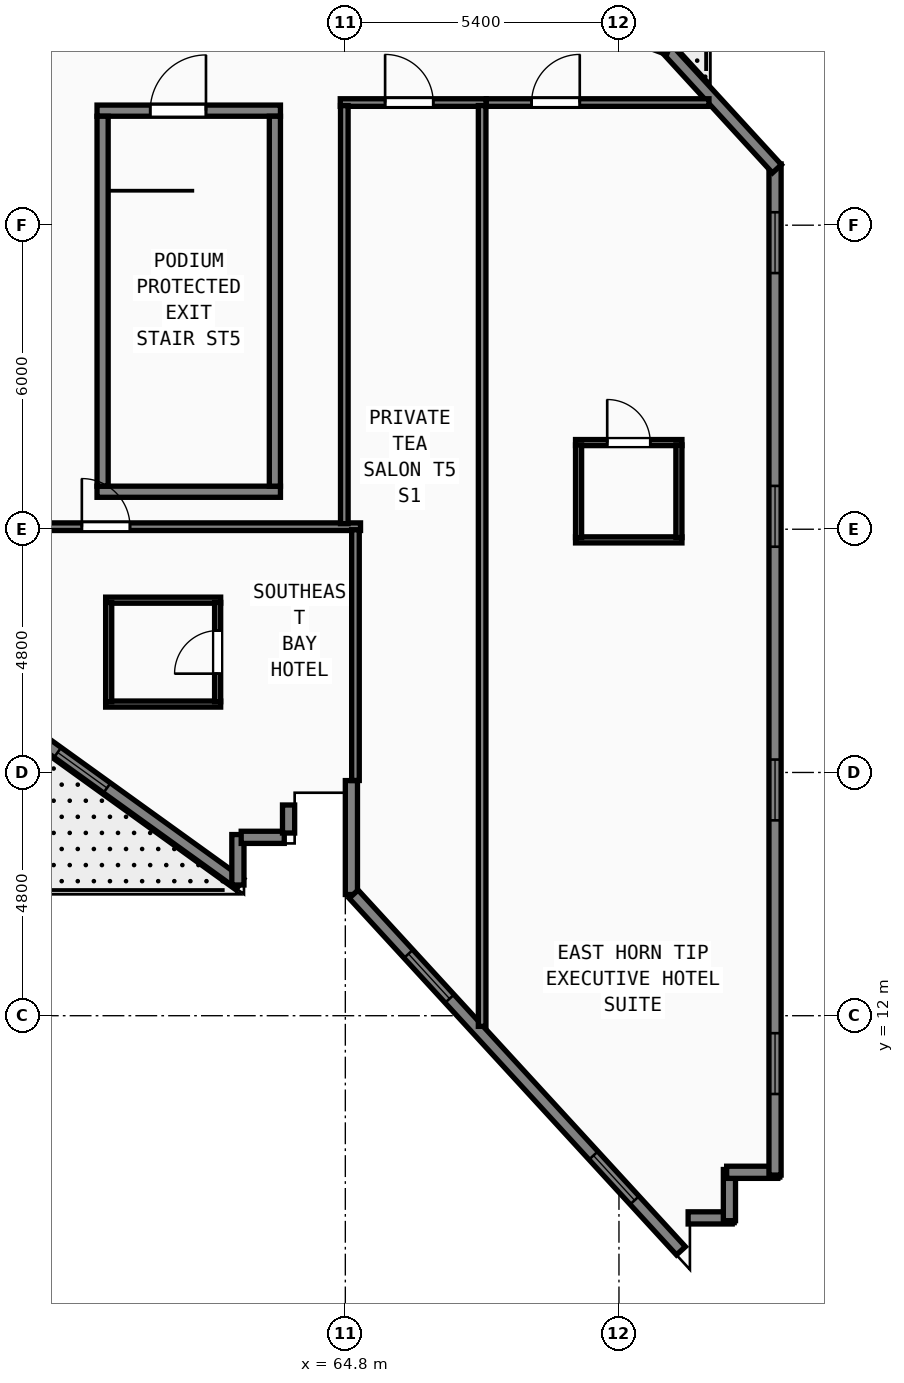
"""IFC4 building model, lengths in metres.
Left out: names, types, materials, properties, quantities, classifications, styles, units other than length and angle.
Written with IfcOpenShell. Run it as: python <this file> out.ifc"""

import sys

from ifc_helpers import new_model, si_unit, direction, frame, frame_2d, origin, origin_2d, place, context, subcontext, project, spatial, rectangle, hollow_rectangle, extrude, element, fill, save


model = new_model("IFC4")
c1 = context("Model", 3, precision=1e-05, world=origin(), true_north=direction((0.0, 1.0)))
c2 = subcontext(c1, "Body", "Model", "MODEL_VIEW")
j1 = project(units=[si_unit("LENGTHUNIT", "METRE"), si_unit("PLANEANGLEUNIT", "RADIAN")], contexts=[c1])
p1 = place(None, origin())
s1 = spatial("IfcSite", under=j1, at=p1, CompositionType="ELEMENT")
p2 = place(p1, origin())
s2 = spatial("IfcBuilding", under=s1, at=p2, CompositionType="ELEMENT")
p3 = place(p2, frame((0.0, 0.0, 24.0)))
s3 = spatial("IfcBuildingStorey", under=s2, at=p3, CompositionType="ELEMENT", Elevation=24.0)
p4 = place(p3, frame((59.9, 29.86, 0.0), z_axis=(0.0, 0.0, 1.0), x_axis=(1.0, 0.0, 0.0)))
e1 = element("IfcWall", 1, at=p4, inside=s3, PredefinedType="SHEAR", context=c2, shape_type="SweptSolid", body=[
    extrude(rectangle(XDim=3.62, YDim=0.22, at=frame_2d((1.81, 0.0))), origin(), (0.0, 0.0, 1.0), 3.6),
])
p5 = place(p4, frame((1.05, 0.0, 0.0)))
e2 = element("IfcOpeningElement", 2, at=p5, cuts=e1, PredefinedType="OPENING", context=c2, shape_type="SweptSolid", body=[
    extrude(rectangle(XDim=1.1, YDim=2.15, at=frame_2d((0.55, 1.075))), frame((0.0, 0.12, 0.0), z_axis=(0.0, -1.0, 0.0), x_axis=(1.0, 0.0, 0.0)), (0.0, 0.0, 1.0), 0.24),
])
p6 = place(p3, frame((59.9, 22.34, 0.0), z_axis=(0.0, 0.0, 1.0), x_axis=(1.0, 0.0, 0.0)))
e3 = element("IfcWall", 3, at=p6, inside=s3, PredefinedType="SHEAR", context=c2, shape_type="SweptSolid", body=[
    extrude(rectangle(XDim=3.62, YDim=0.22, at=frame_2d((1.81, 0.0))), origin(), (0.0, 0.0, 1.0), 3.6),
])
for number, where, z_axis, x_axis in (
    (4, (60.01, 22.45, 0.0), (0.0, 0.0, 1.0), (0.0, 1.0, 0.0)),
    (5, (63.41, 22.45, 0.0), (0.0, 0.0, 1.0), (0.0, 1.0, 0.0)),
):
    element("IfcWall", number, at=place(p3, frame(where, z_axis=z_axis, x_axis=x_axis)), inside=s3, PredefinedType="SHEAR", context=c2, shape_type="SweptSolid", body=[
        extrude(rectangle(XDim=7.3, YDim=0.22, at=frame_2d((3.65, 0.0))), origin(), (0.0, 0.0, 1.0), 3.6),
    ])
for number, where, z_axis, x_axis in (
    (6, (64.2, 16.8, 0.0), (0.0, 0.0, 1.0), (1.0, 0.0, 0.0)),
    (7, (64.2, 27.6, 0.0), (0.0, 0.0, 1.0), (1.0, 0.0, 0.0)),
):
    element("IfcColumn", number, at=place(p3, frame(where, z_axis=z_axis, x_axis=x_axis)), inside=s3, PredefinedType="COLUMN", context=c2, shape_type="SweptSolid", body=[
        extrude(hollow_rectangle(XDim=1.3, YDim=1.3, WallThickness=0.048, at=origin_2d()), origin(), (0.0, 0.0, 1.0), 3.8),
    ])
for number, where, z_axis, x_axis in (
    (8, (70.8, 17.4, 0.0), (0.0, 0.0, 1.0), (1.0, 0.0, 0.0)),
    (9, (70.8, 27.6, 0.0), (0.0, 0.0, 1.0), (1.0, 0.0, 0.0)),
):
    element("IfcColumn", number, at=place(p3, frame(where, z_axis=z_axis, x_axis=x_axis)), inside=s3, PredefinedType="COLUMN", context=c2, shape_type="SweptSolid", body=[
        extrude(hollow_rectangle(XDim=1.15, YDim=1.15, WallThickness=0.042, at=origin_2d()), origin(), (0.0, 0.0, 1.0), 3.8),
    ])
for number, where, z_axis, x_axis in (
    (10, (67.5, 17.1, -0.26), (0.0, 0.0, 1.0), (1.0, 0.0, 0.0)),
    (11, (67.5, 27.6, -0.26), (0.0, 0.0, 1.0), (1.0, 0.0, 0.0)),
):
    element("IfcColumn", number, at=place(p3, frame(where, z_axis=z_axis, x_axis=x_axis)), inside=s3, PredefinedType="COLUMN", context=c2, shape_type="SweptSolid", body=[
        extrude(hollow_rectangle(XDim=1.0, YDim=1.0, WallThickness=0.038, at=origin_2d()), origin(), (0.0, 0.0, 1.0), 4.06),
    ])
p7 = place(p3, frame((53.442, 21.286, 0.0), z_axis=(0.0, 0.0, 1.0), x_axis=(0.811542842993, -0.584292917967, 0.0)))
e12 = element("IfcWall", 12, at=p7, inside=s3, PredefinedType="SOLIDWALL", context=c2, shape_type="SweptSolid", body=[
    extrude(rectangle(XDim=11.438, YDim=0.24, at=frame_2d((5.719, 0.0))), origin(), (0.0, 0.0, 1.0), 3.097),
])
p8 = place(p7, frame((1.6, 0.0, 0.85)))
e13 = element("IfcOpeningElement", 13, at=p8, cuts=e12, PredefinedType="OPENING", context=c2, shape_type="SweptSolid", body=[
    extrude(rectangle(XDim=1.2, YDim=1.85, at=frame_2d((0.6, 0.925))), frame((0.0, 0.13, 0.0), z_axis=(0.0, -1.0, 0.0), x_axis=(1.0, 0.0, 0.0)), (0.0, 0.0, 1.0), 0.26),
])
p9 = place(p7, frame((7.0, 0.0, 0.85)))
e14 = element("IfcOpeningElement", 14, at=p9, cuts=e12, PredefinedType="OPENING", context=c2, shape_type="SweptSolid", body=[
    extrude(rectangle(XDim=1.2, YDim=1.85, at=frame_2d((0.6, 0.925))), frame((0.0, 0.13, 0.0), z_axis=(0.0, -1.0, 0.0), x_axis=(1.0, 0.0, 0.0)), (0.0, 0.0, 1.0), 0.26),
])
p10 = place(p3, frame((62.68, 14.579, 0.0), z_axis=(0.0, 0.0, 1.0), x_axis=(0.0, 1.0, 0.0)))
e15 = element("IfcWall", 15, at=p10, inside=s3, PredefinedType="SOLIDWALL", context=c2, shape_type="SweptSolid", body=[
    extrude(rectangle(XDim=0.996, YDim=0.24, at=frame_2d((0.498, 0.0))), origin(), (0.0, 0.0, 1.0), 3.6),
])
p11 = place(p3, frame((62.745, 15.52, 0.0), z_axis=(0.0, 0.0, 1.0), x_axis=(1.0, 0.0, 0.0)))
e16 = element("IfcWall", 16, at=p11, inside=s3, PredefinedType="SOLIDWALL", context=c2, shape_type="SweptSolid", body=[
    extrude(rectangle(XDim=0.85, YDim=0.24, at=frame_2d((0.425, 0.0))), origin(), (0.0, 0.0, 1.0), 3.6),
])
p12 = place(p3, frame((63.68, 15.605, 0.0), z_axis=(0.0, 0.0, 1.0), x_axis=(0.0, 1.0, 0.0)))
e17 = element("IfcWall", 17, at=p12, inside=s3, PredefinedType="SOLIDWALL", context=c2, shape_type="SweptSolid", body=[
    extrude(rectangle(XDim=0.553, YDim=0.24, at=frame_2d((0.276, 0.0))), origin(), (0.0, 0.0, 1.0), 3.6),
])
p13 = place(p3, frame((64.92, 16.64, 0.0), z_axis=(0.0, 0.0, 1.0), x_axis=(0.0, -1.0, 0.0)))
e18 = element("IfcWall", 18, at=p13, inside=s3, PredefinedType="SOLIDWALL", context=c2, shape_type="SweptSolid", body=[
    extrude(rectangle(XDim=2.248, YDim=0.24, at=frame_2d((1.124, 0.0))), origin(), (0.0, 0.0, 1.0), 3.6),
])
p14 = place(p3, frame((64.964, 14.399, 0.0), z_axis=(0.0, 0.0, 1.0), x_axis=(0.676144639244, -0.736768910054, 0.0)))
e19 = element("IfcWall", 19, at=p14, inside=s3, PredefinedType="SOLIDWALL", context=c2, shape_type="SweptSolid", body=[
    extrude(rectangle(XDim=9.552, YDim=0.24, at=frame_2d((4.776, 0.0))), origin(), (0.0, 0.0, 1.0), 3.6),
])
p15 = place(p14, frame((1.6, 0.0, 0.85)))
e20 = element("IfcOpeningElement", 20, at=p15, cuts=e19, PredefinedType="OPENING", context=c2, shape_type="SweptSolid", body=[
    extrude(rectangle(XDim=1.2, YDim=1.85, at=frame_2d((0.6, 0.925))), frame((0.0, 0.13, 0.0), z_axis=(0.0, -1.0, 0.0), x_axis=(1.0, 0.0, 0.0)), (0.0, 0.0, 1.0), 0.26),
])
p16 = place(p14, frame((7.0, 0.0, 0.85)))
e21 = element("IfcOpeningElement", 21, at=p16, cuts=e19, PredefinedType="OPENING", context=c2, shape_type="SweptSolid", body=[
    extrude(rectangle(XDim=1.2, YDim=1.85, at=frame_2d((0.6, 0.925))), frame((0.0, 0.13, 0.0), z_axis=(0.0, -1.0, 0.0), x_axis=(1.0, 0.0, 0.0)), (0.0, 0.0, 1.0), 0.26),
])
p17 = place(p3, frame((71.565, 8.01, 0.0), z_axis=(0.0, 0.0, 1.0), x_axis=(1.0, 0.0, 0.0)))
e22 = element("IfcWall", 22, at=p17, inside=s3, PredefinedType="SOLIDWALL", context=c2, shape_type="SweptSolid", body=[
    extrude(rectangle(XDim=0.87, YDim=0.24, at=frame_2d((0.435, 0.0))), origin(), (0.0, 0.0, 1.0), 3.6),
])
for number, where, z_axis, x_axis in (
    (23, (72.38, 7.955, 0.0), (0.0, 0.0, 1.0), (0.0, 1.0, 0.0)),
    (24, (72.325, 8.91, 0.0), (0.0, 0.0, 1.0), (1.0, 0.0, 0.0)),
):
    element("IfcWall", number, at=place(p3, frame(where, z_axis=z_axis, x_axis=x_axis)), inside=s3, PredefinedType="SOLIDWALL", context=c2, shape_type="SweptSolid", body=[
        extrude(rectangle(XDim=1.01, YDim=0.24, at=frame_2d((0.505, 0.0))), origin(), (0.0, 0.0, 1.0), 3.6),
    ])
p18 = place(p3, frame((73.28, 8.855, 0.0), z_axis=(0.0, 0.0, 1.0), x_axis=(0.0, 1.0, 0.0)))
e25 = element("IfcWall", 25, at=p18, inside=s3, PredefinedType="SOLIDWALL", context=c2, shape_type="SweptSolid", body=[
    extrude(rectangle(XDim=19.953, YDim=0.24, at=frame_2d((9.977, 0.0))), origin(), (0.0, 0.0, 1.0), 3.6),
])
p19 = place(p18, frame((1.6, 0.0, 0.85)))
e26 = element("IfcOpeningElement", 26, at=p19, cuts=e25, PredefinedType="OPENING", context=c2, shape_type="SweptSolid", body=[
    extrude(rectangle(XDim=1.2, YDim=1.85, at=frame_2d((0.6, 0.925))), frame((0.0, 0.13, 0.0), z_axis=(0.0, -1.0, 0.0), x_axis=(1.0, 0.0, 0.0)), (0.0, 0.0, 1.0), 0.26),
])
p20 = place(p18, frame((7.0, 0.0, 0.85)))
e27 = element("IfcOpeningElement", 27, at=p20, cuts=e25, PredefinedType="OPENING", context=c2, shape_type="SweptSolid", body=[
    extrude(rectangle(XDim=1.2, YDim=1.85, at=frame_2d((0.6, 0.925))), frame((0.0, 0.13, 0.0), z_axis=(0.0, -1.0, 0.0), x_axis=(1.0, 0.0, 0.0)), (0.0, 0.0, 1.0), 0.26),
])
p21 = place(p18, frame((12.4, 0.0, 0.85)))
e28 = element("IfcOpeningElement", 28, at=p21, cuts=e25, PredefinedType="OPENING", context=c2, shape_type="SweptSolid", body=[
    extrude(rectangle(XDim=1.2, YDim=1.85, at=frame_2d((0.6, 0.925))), frame((0.0, 0.13, 0.0), z_axis=(0.0, -1.0, 0.0), x_axis=(1.0, 0.0, 0.0)), (0.0, 0.0, 1.0), 0.26),
])
p22 = place(p18, frame((17.8, 0.0, 0.85)))
e29 = element("IfcOpeningElement", 29, at=p22, cuts=e25, PredefinedType="OPENING", context=c2, shape_type="SweptSolid", body=[
    extrude(rectangle(XDim=1.2, YDim=1.85, at=frame_2d((0.6, 0.925))), frame((0.0, 0.13, 0.0), z_axis=(0.0, -1.0, 0.0), x_axis=(1.0, 0.0, 0.0)), (0.0, 0.0, 1.0), 0.26),
])
p23 = place(p3, frame((73.317, 28.713, 0.0), z_axis=(0.0, 0.0, 1.0), x_axis=(-0.675758228752, 0.737123338577, 0.0)))
e30 = element("IfcWall", 30, at=p23, inside=s3, PredefinedType="SOLIDWALL", context=c2, shape_type="SweptSolid", body=[
    extrude(rectangle(XDim=3.29, YDim=0.24, at=frame_2d((1.645, 0.0))), origin(), (0.0, 0.0, 1.0), 3.6),
])
p24 = place(p3, frame((71.183, 31.078, 0.0), z_axis=(0.0, 0.0, 1.0), x_axis=(-0.936332044214, 0.351115797106, 0.0)))
e31 = element("IfcWall", 31, at=p24, inside=s3, PredefinedType="SOLIDWALL", context=c2, shape_type="SweptSolid", body=[
    extrude(rectangle(XDim=7.0, YDim=0.24, at=frame_2d((3.5, 0.0))), origin(), (0.0, 0.0, 1.0), 3.6),
])
p25 = place(p24, frame((1.6, 0.0, 0.85)))
e32 = element("IfcOpeningElement", 32, at=p25, cuts=e31, PredefinedType="OPENING", context=c2, shape_type="SweptSolid", body=[
    extrude(rectangle(XDim=1.2, YDim=1.85, at=frame_2d((0.6, 0.925))), frame((0.0, 0.13, 0.0), z_axis=(0.0, -1.0, 0.0), x_axis=(1.0, 0.0, 0.0)), (0.0, 0.0, 1.0), 0.26),
])
p26 = place(p3, frame((57.86, 21.65, 0.0), z_axis=(0.0, 0.0, 1.0), x_axis=(1.0, 0.0, 0.0)))
e33 = element("IfcWall", 33, at=p26, inside=s3, PredefinedType="PARTITIONING", context=c2, shape_type="SweptSolid", body=[
    extrude(rectangle(XDim=7.24, YDim=0.15, at=frame_2d((3.62, 0.0))), origin(), (0.0, 0.0, 1.0), 3.6),
])
p27 = place(p26, frame((2.69, 0.0, 0.0), z_axis=(0.0, 0.0, 1.0), x_axis=(-1.0, 0.0, 0.0)))
e34 = element("IfcOpeningElement", 34, at=p27, cuts=e33, PredefinedType="OPENING", context=c2, shape_type="SweptSolid", body=[
    extrude(rectangle(XDim=0.95, YDim=2.15, at=frame_2d((0.475, 1.075))), frame((0.0, 0.085, 0.0), z_axis=(0.0, -1.0, 0.0), x_axis=(1.0, 0.0, 0.0)), (0.0, 0.0, 1.0), 0.17),
])
p28 = place(p3, frame((65.0, 16.642, 0.0), z_axis=(0.0, 0.0, 1.0), x_axis=(0.0, 1.0, 0.0)))
e35 = element("IfcWall", 35, at=p28, inside=s3, PredefinedType="PARTITIONING", context=c2, shape_type="SweptSolid", body=[
    extrude(rectangle(XDim=4.948, YDim=0.15, at=frame_2d((2.474, 0.0))), origin(), (0.0, 0.0, 1.0), 3.6),
])
for number, where, z_axis, x_axis in (
    (36, (60.07, 20.2, 0.0), (0.0, 0.0, 1.0), (1.0, 0.0, 0.0)),
    (37, (60.07, 18.15, 0.0), (0.0, 0.0, 1.0), (1.0, 0.0, 0.0)),
):
    element("IfcWall", number, at=place(p3, frame(where, z_axis=z_axis, x_axis=x_axis)), inside=s3, PredefinedType="PARTITIONING", context=c2, shape_type="SweptSolid", body=[
        extrude(rectangle(XDim=2.27, YDim=0.12, at=frame_2d((1.135, 0.0))), origin(), (0.0, 0.0, 1.0), 3.6),
    ])
p29 = place(p3, frame((60.13, 18.195, 0.0), z_axis=(0.0, 0.0, 1.0), x_axis=(0.0, 1.0, 0.0)))
e38 = element("IfcWall", 38, at=p29, inside=s3, PredefinedType="PARTITIONING", context=c2, shape_type="SweptSolid", body=[
    extrude(rectangle(XDim=1.96, YDim=0.12, at=frame_2d((0.98, 0.0))), origin(), (0.0, 0.0, 1.0), 3.6),
])
p30 = place(p3, frame((62.28, 18.195, 0.0), z_axis=(0.0, 0.0, 1.0), x_axis=(0.0, 1.0, 0.0)))
e39 = element("IfcWall", 39, at=p30, inside=s3, PredefinedType="PARTITIONING", context=c2, shape_type="SweptSolid", body=[
    extrude(rectangle(XDim=1.96, YDim=0.12, at=frame_2d((0.98, 0.0))), origin(), (0.0, 0.0, 1.0), 3.6),
])
p31 = place(p30, frame((0.555, 0.0, 0.0)))
e40 = element("IfcOpeningElement", 40, at=p31, cuts=e39, PredefinedType="OPENING", context=c2, shape_type="SweptSolid", body=[
    extrude(rectangle(XDim=0.85, YDim=2.1, at=frame_2d((0.425, 1.05))), frame((0.0, 0.07, 0.0), z_axis=(0.0, -1.0, 0.0), x_axis=(1.0, 0.0, 0.0)), (0.0, 0.0, 1.0), 0.14),
])
p32 = place(p3, frame((64.7, 30.02, 0.0), z_axis=(0.0, 0.0, 1.0), x_axis=(1.0, 0.0, 0.0)))
e41 = element("IfcWall", 41, at=p32, inside=s3, PredefinedType="PARTITIONING", context=c2, shape_type="SweptSolid", body=[
    extrude(rectangle(XDim=2.88, YDim=0.15, at=frame_2d((1.44, 0.0))), origin(), (0.0, 0.0, 1.0), 3.6),
])
p33 = place(p32, frame((1.835, 0.0, 0.0), z_axis=(0.0, 0.0, 1.0), x_axis=(-1.0, 0.0, 0.0)))
e42 = element("IfcOpeningElement", 42, at=p33, cuts=e41, PredefinedType="OPENING", context=c2, shape_type="SweptSolid", body=[
    extrude(rectangle(XDim=0.95, YDim=2.12, at=frame_2d((0.475, 1.06))), frame((0.0, 0.085, 0.0), z_axis=(0.0, -1.0, 0.0), x_axis=(1.0, 0.0, 0.0)), (0.0, 0.0, 1.0), 0.17),
])
p34 = place(p3, frame((64.78, 21.71, 0.0), z_axis=(0.0, 0.0, 1.0), x_axis=(0.0, 1.0, 0.0)))
e43 = element("IfcWall", 43, at=p34, inside=s3, PredefinedType="PARTITIONING", context=c2, shape_type="SweptSolid", body=[
    extrude(rectangle(XDim=8.25, YDim=0.15, at=frame_2d((4.125, 0.0))), origin(), (0.0, 0.0, 1.0), 3.6),
])
p35 = place(p3, frame((67.5, 11.791, 0.0), z_axis=(0.0, 0.0, 1.0), x_axis=(0.0, 1.0, 0.0)))
e44 = element("IfcWall", 44, at=p35, inside=s3, PredefinedType="PARTITIONING", context=c2, shape_type="SweptSolid", body=[
    extrude(rectangle(XDim=18.169, YDim=0.15, at=frame_2d((9.085, 0.0))), origin(), (0.0, 0.0, 1.0), 3.6),
])
p36 = place(p3, frame((67.582, 30.02, 0.0), z_axis=(0.0, 0.0, 1.0), x_axis=(1.0, 0.0, 0.0)))
e45 = element("IfcWall", 45, at=p36, inside=s3, PredefinedType="PARTITIONING", context=c2, shape_type="SweptSolid", body=[
    extrude(rectangle(XDim=4.394, YDim=0.15, at=frame_2d((2.197, 0.0))), origin(), (0.0, 0.0, 1.0), 3.6),
])
p37 = place(p36, frame((1.844, 0.0, 0.0), z_axis=(0.0, 0.0, 1.0), x_axis=(-1.0, 0.0, 0.0)))
e46 = element("IfcOpeningElement", 46, at=p37, cuts=e45, PredefinedType="OPENING", context=c2, shape_type="SweptSolid", body=[
    extrude(rectangle(XDim=0.95, YDim=2.18, at=frame_2d((0.475, 1.09))), frame((0.0, 0.085, 0.0), z_axis=(0.0, -1.0, 0.0), x_axis=(1.0, 0.0, 0.0)), (0.0, 0.0, 1.0), 0.17),
])
p38 = place(p3, frame((69.343, 23.31, 0.0), z_axis=(0.0, 0.0, 1.0), x_axis=(1.0, 0.0, 0.0)))
e47 = element("IfcWall", 47, at=p38, inside=s3, PredefinedType="PARTITIONING", context=c2, shape_type="SweptSolid", body=[
    extrude(rectangle(XDim=2.1, YDim=0.12, at=frame_2d((1.05, 0.0))), origin(), (0.0, 0.0, 1.0), 3.6),
])
p39 = place(p38, frame((1.475, 0.0, 0.0), z_axis=(0.0, 0.0, 1.0), x_axis=(-1.0, 0.0, 0.0)))
e48 = element("IfcOpeningElement", 48, at=p39, cuts=e47, PredefinedType="OPENING", context=c2, shape_type="SweptSolid", body=[
    extrude(rectangle(XDim=0.85, YDim=2.1, at=frame_2d((0.425, 1.05))), frame((0.0, 0.07, 0.0), z_axis=(0.0, -1.0, 0.0), x_axis=(1.0, 0.0, 0.0)), (0.0, 0.0, 1.0), 0.14),
])
p40 = place(p3, frame((69.343, 21.39, 0.0), z_axis=(0.0, 0.0, 1.0), x_axis=(1.0, 0.0, 0.0)))
e49 = element("IfcWall", 49, at=p40, inside=s3, PredefinedType="PARTITIONING", context=c2, shape_type="SweptSolid", body=[
    extrude(rectangle(XDim=2.1, YDim=0.12, at=frame_2d((1.05, 0.0))), origin(), (0.0, 0.0, 1.0), 3.6),
])
for number, where, z_axis, x_axis in (
    (50, (69.403, 21.435, 0.0), (0.0, 0.0, 1.0), (0.0, 1.0, 0.0)),
    (51, (71.383, 21.435, 0.0), (0.0, 0.0, 1.0), (0.0, 1.0, 0.0)),
):
    element("IfcWall", number, at=place(p3, frame(where, z_axis=z_axis, x_axis=x_axis)), inside=s3, PredefinedType="PARTITIONING", context=c2, shape_type="SweptSolid", body=[
        extrude(rectangle(XDim=1.83, YDim=0.12, at=frame_2d((0.915, 0.0))), origin(), (0.0, 0.0, 1.0), 3.6),
    ])
p41 = place(p9, origin())
e52 = element("IfcWindow", 52, at=p41, inside=s3, PartitioningType="SINGLE_PANEL", PredefinedType="WINDOW", context=c2, shape_type="SweptSolid", body=[
    extrude(rectangle(XDim=1.2, YDim=1.85, at=frame_2d((0.6, 0.925))), frame((0.0, 0.03, 0.0), z_axis=(0.0, -1.0, 0.0), x_axis=(1.0, 0.0, 0.0)), (0.0, 0.0, 1.0), 0.06),
])
fill(e14, e52)
p42 = place(p15, origin())
e53 = element("IfcWindow", 53, at=p42, inside=s3, PartitioningType="SINGLE_PANEL", PredefinedType="WINDOW", context=c2, shape_type="SweptSolid", body=[
    extrude(rectangle(XDim=1.2, YDim=1.85, at=frame_2d((0.6, 0.925))), frame((0.0, 0.03, 0.0), z_axis=(0.0, -1.0, 0.0), x_axis=(1.0, 0.0, 0.0)), (0.0, 0.0, 1.0), 0.06),
])
fill(e20, e53)
p43 = place(p16, origin())
e54 = element("IfcWindow", 54, at=p43, inside=s3, PartitioningType="SINGLE_PANEL", PredefinedType="WINDOW", context=c2, shape_type="SweptSolid", body=[
    extrude(rectangle(XDim=1.2, YDim=1.85, at=frame_2d((0.6, 0.925))), frame((0.0, 0.03, 0.0), z_axis=(0.0, -1.0, 0.0), x_axis=(1.0, 0.0, 0.0)), (0.0, 0.0, 1.0), 0.06),
])
fill(e21, e54)
p44 = place(p19, origin())
e55 = element("IfcWindow", 55, at=p44, inside=s3, PartitioningType="SINGLE_PANEL", PredefinedType="WINDOW", context=c2, shape_type="SweptSolid", body=[
    extrude(rectangle(XDim=1.2, YDim=1.85, at=frame_2d((0.6, 0.925))), frame((0.0, 0.03, 0.0), z_axis=(0.0, -1.0, 0.0), x_axis=(1.0, 0.0, 0.0)), (0.0, 0.0, 1.0), 0.06),
])
fill(e26, e55)
p45 = place(p20, origin())
e56 = element("IfcWindow", 56, at=p45, inside=s3, PartitioningType="SINGLE_PANEL", PredefinedType="WINDOW", context=c2, shape_type="SweptSolid", body=[
    extrude(rectangle(XDim=1.2, YDim=1.85, at=frame_2d((0.6, 0.925))), frame((0.0, 0.03, 0.0), z_axis=(0.0, -1.0, 0.0), x_axis=(1.0, 0.0, 0.0)), (0.0, 0.0, 1.0), 0.06),
])
fill(e27, e56)
p46 = place(p21, origin())
e57 = element("IfcWindow", 57, at=p46, inside=s3, PartitioningType="SINGLE_PANEL", PredefinedType="WINDOW", context=c2, shape_type="SweptSolid", body=[
    extrude(rectangle(XDim=1.2, YDim=1.85, at=frame_2d((0.6, 0.925))), frame((0.0, 0.03, 0.0), z_axis=(0.0, -1.0, 0.0), x_axis=(1.0, 0.0, 0.0)), (0.0, 0.0, 1.0), 0.06),
])
fill(e28, e57)
p47 = place(p22, origin())
e58 = element("IfcWindow", 58, at=p47, inside=s3, PartitioningType="SINGLE_PANEL", PredefinedType="WINDOW", context=c2, shape_type="SweptSolid", body=[
    extrude(rectangle(XDim=1.2, YDim=1.85, at=frame_2d((0.6, 0.925))), frame((0.0, 0.03, 0.0), z_axis=(0.0, -1.0, 0.0), x_axis=(1.0, 0.0, 0.0)), (0.0, 0.0, 1.0), 0.06),
])
fill(e29, e58)
p48 = place(p5, origin())
e59 = element("IfcDoor", 59, at=p48, inside=s3, OperationType="SINGLE_SWING_RIGHT", PredefinedType="DOOR", context=c2, shape_type="SweptSolid", body=[
    extrude(rectangle(XDim=1.1, YDim=2.15, at=frame_2d((0.55, 1.075))), frame((0.0, 0.025, 0.0), z_axis=(0.0, -1.0, 0.0), x_axis=(1.0, 0.0, 0.0)), (0.0, 0.0, 1.0), 0.05),
])
fill(e2, e59)
p49 = place(p27, origin())
e60 = element("IfcDoor", 60, at=p49, inside=s3, OperationType="SINGLE_SWING_RIGHT", PredefinedType="DOOR", context=c2, shape_type="SweptSolid", body=[
    extrude(rectangle(XDim=0.95, YDim=2.15, at=frame_2d((0.475, 1.075))), frame((0.0, 0.025, 0.0), z_axis=(0.0, -1.0, 0.0), x_axis=(1.0, 0.0, 0.0)), (0.0, 0.0, 1.0), 0.05),
])
fill(e34, e60)
p50 = place(p31, origin())
e61 = element("IfcDoor", 61, at=p50, inside=s3, OperationType="SINGLE_SWING_LEFT", PredefinedType="DOOR", context=c2, shape_type="SweptSolid", body=[
    extrude(rectangle(XDim=0.85, YDim=2.1, at=frame_2d((0.425, 1.05))), frame((0.0, 0.025, 0.0), z_axis=(0.0, -1.0, 0.0), x_axis=(1.0, 0.0, 0.0)), (0.0, 0.0, 1.0), 0.05),
])
fill(e40, e61)
p51 = place(p33, origin())
e62 = element("IfcDoor", 62, at=p51, inside=s3, OperationType="SINGLE_SWING_RIGHT", PredefinedType="DOOR", context=c2, shape_type="SweptSolid", body=[
    extrude(rectangle(XDim=0.95, YDim=2.12, at=frame_2d((0.475, 1.06))), frame((0.0, 0.025, 0.0), z_axis=(0.0, -1.0, 0.0), x_axis=(1.0, 0.0, 0.0)), (0.0, 0.0, 1.0), 0.05),
])
fill(e42, e62)
p52 = place(p37, origin())
e63 = element("IfcDoor", 63, at=p52, inside=s3, OperationType="SINGLE_SWING_LEFT", PredefinedType="DOOR", context=c2, shape_type="SweptSolid", body=[
    extrude(rectangle(XDim=0.95, YDim=2.18, at=frame_2d((0.475, 1.09))), frame((0.0, 0.025, 0.0), z_axis=(0.0, -1.0, 0.0), x_axis=(1.0, 0.0, 0.0)), (0.0, 0.0, 1.0), 0.05),
])
fill(e46, e63)
p53 = place(p39, origin())
e64 = element("IfcDoor", 64, at=p53, inside=s3, OperationType="SINGLE_SWING_RIGHT", PredefinedType="DOOR", context=c2, shape_type="SweptSolid", body=[
    extrude(rectangle(XDim=0.85, YDim=2.1, at=frame_2d((0.425, 1.05))), frame((0.0, 0.025, 0.0), z_axis=(0.0, -1.0, 0.0), x_axis=(1.0, 0.0, 0.0)), (0.0, 0.0, 1.0), 0.05),
])
fill(e48, e64)
save(model, sys.argv[1])
